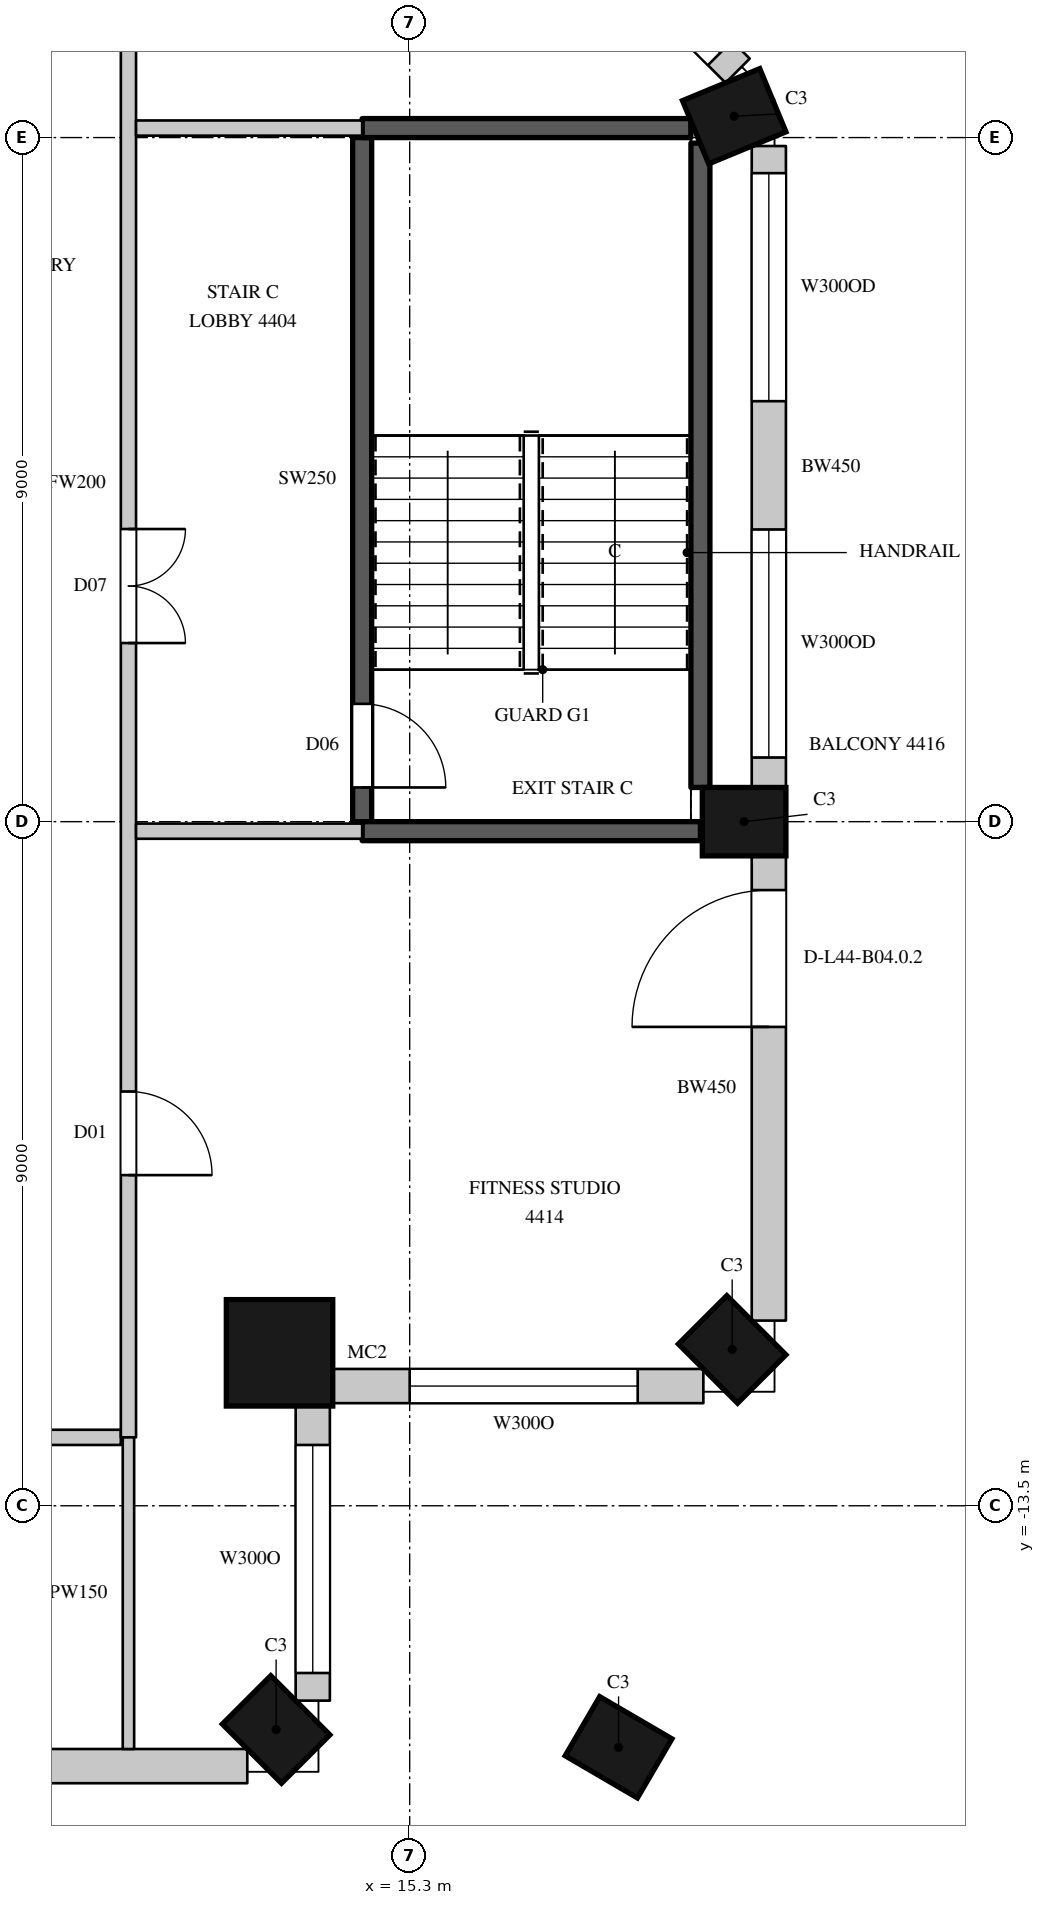
"""IFC4 building model, lengths in metres.
Left out: names, types, materials, properties, quantities, classifications, styles, units other than length and angle.
Written with IfcOpenShell. Run it as: python <this file> out.ifc"""

import sys

from ifc_helpers import new_model, si_unit, direction, frame, frame_2d, origin, origin_2d, place, context, subcontext, project, spatial, rectangle, circle, extrude, element, fill, save


model = new_model("IFC4")
c1 = context("Model", 3, precision=1e-05, world=origin(), true_north=direction((0.0, 1.0)))
c2 = subcontext(c1, "Body", "Model", "MODEL_VIEW")
j1 = project(units=[si_unit("LENGTHUNIT", "METRE"), si_unit("PLANEANGLEUNIT", "RADIAN")], contexts=[c1])
p1 = place(None, origin())
s1 = spatial("IfcSite", under=j1, at=p1, CompositionType="ELEMENT")
p2 = place(p1, origin())
s2 = spatial("IfcBuilding", under=s1, at=p2, CompositionType="ELEMENT")
p3 = place(p2, frame((0.0, 0.0, 201.5)))
s3 = spatial("IfcBuildingStorey", under=s2, at=p3, CompositionType="ELEMENT", Elevation=201.5)
p4 = place(p3, frame((13.543, -16.443, 0.0), z_axis=(0.0, 0.0, 1.0), x_axis=(0.707106781187, 0.707106781187, 0.0)))
e1 = element("IfcColumn", 1, at=p4, inside=s3, PredefinedType="COLUMN", context=c2, shape_type="SweptSolid", body=[
    extrude(rectangle(XDim=0.9, YDim=1.1, at=origin_2d()), origin(), (0.0, 0.0, 1.0), 4.1),
])
p5 = place(p3, frame((13.588, -11.488, 0.0), z_axis=(0.0, 0.0, 1.0), x_axis=(1.0, 0.0, 0.0)))
e2 = element("IfcColumn", 2, at=p5, inside=s3, PredefinedType="COLUMN", context=c2, shape_type="SweptSolid", body=[
    extrude(circle(Radius=0.7, at=origin_2d()), origin(), (0.0, 0.0, 1.0), 4.1),
])
for number, where, z_axis, x_axis in (
    (3, (19.543, -11.443, 0.0), (0.0, 0.0, 1.0), (0.707, 0.707, 0.0)),
    (4, (19.7, -4.5, 0.0), (0.0, 0.0, 1.0), (0.0, 1.0, 0.0)),
    (5, (19.57, 4.78, 0.0), (0.0, 0.0, 1.0), (-0.383, 0.924, 0.0)),
    (6, (18.048, -16.677, 0.0), (0.0, 0.0, 1.0), (0.504, 0.863, 0.0)),
):
    element("IfcColumn", number, at=place(p3, frame(where, z_axis=z_axis, x_axis=x_axis)), inside=s3, PredefinedType="COLUMN", context=c2, shape_type="SweptSolid", body=[
        extrude(rectangle(XDim=0.9, YDim=1.1, at=origin_2d()), origin(), (0.0, 0.0, 1.0), 4.1),
    ])
p6 = place(p3, frame((6.75, -16.925, 0.0), z_axis=(0.0, 0.0, 1.0), x_axis=(1.0, 0.0, 0.0)))
e7 = element("IfcWall", 7, at=p6, inside=s3, PredefinedType="SOLIDWALL", context=c2, shape_type="SweptSolid", body=[
    extrude(rectangle(XDim=6.414, YDim=0.45, at=frame_2d((3.207, 0.0))), origin(), (0.0, 0.0, 1.0), 3.8),
])
p7 = place(p6, frame((0.525, 0.0, 0.0)))
e8 = element("IfcOpeningElement", 8, at=p7, cuts=e7, PredefinedType="OPENING", context=c2, shape_type="SweptSolid", body=[
    extrude(rectangle(XDim=1.8, YDim=2.4, at=frame_2d((0.9, 1.2))), frame((0.0, 0.235, 0.0), z_axis=(0.0, -1.0, 0.0), x_axis=(1.0, 0.0, 0.0)), (0.0, 0.0, 1.0), 0.47),
])
p8 = place(p3, frame((14.025, -16.064, 0.0), z_axis=(0.0, 0.0, 1.0), x_axis=(0.0, 1.0, 0.0)))
e9 = element("IfcWall", 9, at=p8, inside=s3, PredefinedType="SOLIDWALL", context=c2, shape_type="SweptSolid", body=[
    extrude(rectangle(XDim=3.909, YDim=0.45, at=frame_2d((1.955, 0.0))), origin(), (0.0, 0.0, 1.0), 3.8),
])
p9 = place(p8, frame((0.364, 0.0, 1.05)))
e10 = element("IfcOpeningElement", 10, at=p9, cuts=e9, PredefinedType="OPENING", context=c2, shape_type="SweptSolid", body=[
    extrude(rectangle(XDim=3.0, YDim=2.4, at=frame_2d((1.5, 1.2))), frame((0.0, 0.235, 0.0), z_axis=(0.0, -1.0, 0.0), x_axis=(1.0, 0.0, 0.0)), (0.0, 0.0, 1.0), 0.47),
])
p10 = place(p3, frame((14.255, -11.925, 0.0), z_axis=(0.0, 0.0, 1.0), x_axis=(1.0, 0.0, 0.0)))
e11 = element("IfcWall", 11, at=p10, inside=s3, PredefinedType="SOLIDWALL", context=c2, shape_type="SweptSolid", body=[
    extrude(rectangle(XDim=4.909, YDim=0.45, at=frame_2d((2.455, 0.0))), origin(), (0.0, 0.0, 1.0), 3.8),
])
p11 = place(p10, frame((1.045, 0.0, 1.05)))
e12 = element("IfcOpeningElement", 12, at=p11, cuts=e11, PredefinedType="OPENING", context=c2, shape_type="SweptSolid", body=[
    extrude(rectangle(XDim=3.0, YDim=2.4, at=frame_2d((1.5, 1.2))), frame((0.0, 0.235, 0.0), z_axis=(0.0, -1.0, 0.0), x_axis=(1.0, 0.0, 0.0)), (0.0, 0.0, 1.0), 0.47),
])
p12 = place(p3, frame((20.025, -11.064, 0.0), z_axis=(0.0, 0.0, 1.0), x_axis=(0.0, 1.0, 0.0)))
e13 = element("IfcWall", 13, at=p12, inside=s3, PredefinedType="SOLIDWALL", context=c2, shape_type="SweptSolid", body=[
    extrude(rectangle(XDim=6.114, YDim=0.45, at=frame_2d((3.057, 0.0))), origin(), (0.0, 0.0, 1.0), 3.8),
])
p13 = place(p12, frame((3.864, 0.0, 0.0)))
e14 = element("IfcOpeningElement", 14, at=p13, cuts=e13, PredefinedType="OPENING", context=c2, shape_type="SweptSolid", body=[
    extrude(rectangle(XDim=1.8, YDim=2.4, at=frame_2d((0.9, 1.2))), frame((0.0, 0.235, 0.0), z_axis=(0.0, -1.0, 0.0), x_axis=(1.0, 0.0, 0.0)), (0.0, 0.0, 1.0), 0.47),
])
p14 = place(p3, frame((20.025, -4.05, 0.0), z_axis=(0.0, 0.0, 1.0), x_axis=(0.0, 1.0, 0.0)))
e15 = element("IfcWall", 15, at=p14, inside=s3, PredefinedType="SOLIDWALL", context=c2, shape_type="SweptSolid", body=[
    extrude(rectangle(XDim=8.439, YDim=0.45, at=frame_2d((4.219, 0.0))), origin(), (0.0, 0.0, 1.0), 3.8),
])
p15 = place(p14, frame((0.394, 0.0, 1.05)))
e16 = element("IfcOpeningElement", 16, at=p15, cuts=e15, PredefinedType="OPENING", context=c2, shape_type="SweptSolid", body=[
    extrude(rectangle(XDim=3.0, YDim=2.4, at=frame_2d((1.5, 1.2))), frame((0.0, 0.235, 0.0), z_axis=(0.0, -1.0, 0.0), x_axis=(1.0, 0.0, 0.0)), (0.0, 0.0, 1.0), 0.47),
])
p16 = place(p14, frame((5.082, 0.0, 1.05)))
e17 = element("IfcOpeningElement", 17, at=p16, cuts=e15, PredefinedType="OPENING", context=c2, shape_type="SweptSolid", body=[
    extrude(rectangle(XDim=3.0, YDim=2.4, at=frame_2d((1.5, 1.2))), frame((0.0, 0.235, 0.0), z_axis=(0.0, -1.0, 0.0), x_axis=(1.0, 0.0, 0.0)), (0.0, 0.0, 1.0), 0.47),
])
p17 = place(p3, frame((19.615, 5.379, 0.0), z_axis=(0.0, 0.0, 1.0), x_axis=(-0.707089646058, 0.7071239159, 0.0)))
e18 = element("IfcWall", 18, at=p17, inside=s3, PredefinedType="SOLIDWALL", context=c2, shape_type="SweptSolid", body=[
    extrude(rectangle(XDim=7.124, YDim=0.45, at=frame_2d((3.562, 0.0))), origin(), (0.0, 0.0, 1.0), 3.8),
])
p18 = place(p17, frame((0.328, 0.0, 1.05)))
e19 = element("IfcOpeningElement", 19, at=p18, cuts=e18, PredefinedType="OPENING", context=c2, shape_type="SweptSolid", body=[
    extrude(rectangle(XDim=2.4, YDim=2.4, at=frame_2d((1.2, 1.2))), frame((0.0, 0.235, 0.0), z_axis=(0.0, -1.0, 0.0), x_axis=(1.0, 0.0, 0.0)), (0.0, 0.0, 1.0), 0.47),
])
p19 = place(p17, frame((4.359, 0.0, 1.05)))
e20 = element("IfcOpeningElement", 20, at=p19, cuts=e18, PredefinedType="OPENING", context=c2, shape_type="SweptSolid", body=[
    extrude(rectangle(XDim=2.4, YDim=2.4, at=frame_2d((1.2, 1.2))), frame((0.0, 0.235, 0.0), z_axis=(0.0, -1.0, 0.0), x_axis=(1.0, 0.0, 0.0)), (0.0, 0.0, 1.0), 0.47),
])
p20 = place(p3, frame((6.28, -12.6, 0.0), z_axis=(0.0, 0.0, 1.0), x_axis=(1.0, 0.0, 0.0)))
e21 = element("IfcWall", 21, at=p20, inside=s3, PredefinedType="PARTITIONING", context=c2, shape_type="SweptSolid", body=[
    extrude(rectangle(XDim=5.22, YDim=0.2, at=frame_2d((2.61, 0.0))), origin(), (0.0, 0.0, 1.0), 3.8),
])
p21 = place(p20, frame((0.8, 0.0, 0.0)))
e22 = element("IfcOpeningElement", 22, at=p21, cuts=e21, PredefinedType="OPENING", context=c2, shape_type="SweptSolid", body=[
    extrude(rectangle(XDim=1.1, YDim=2.4, at=frame_2d((0.55, 1.2))), frame((0.0, 0.11, 0.0), z_axis=(0.0, -1.0, 0.0), x_axis=(1.0, 0.0, 0.0)), (0.0, 0.0, 1.0), 0.22),
])
p22 = place(p3, frame((11.6, -12.6, 0.0), z_axis=(0.0, 0.0, 1.0), x_axis=(0.0, 1.0, 0.0)))
e23 = element("IfcWall", 23, at=p22, inside=s3, PredefinedType="PARTITIONING", context=c2, shape_type="SweptSolid", body=[
    extrude(rectangle(XDim=25.1, YDim=0.2, at=frame_2d((12.55, 0.0))), origin(), (0.0, 0.0, 1.0), 3.8),
])
p23 = place(p22, frame((10.45, 0.0, 0.0)))
e24 = element("IfcOpeningElement", 24, at=p23, cuts=e23, PredefinedType="OPENING", context=c2, shape_type="SweptSolid", body=[
    extrude(rectangle(XDim=1.5, YDim=2.4, at=frame_2d((0.75, 1.2))), frame((0.0, 0.11, 0.0), z_axis=(0.0, -1.0, 0.0), x_axis=(1.0, 0.0, 0.0)), (0.0, 0.0, 1.0), 0.22),
])
p24 = place(p22, frame((3.45, 0.0, 0.0)))
e25 = element("IfcOpeningElement", 25, at=p24, cuts=e23, PredefinedType="OPENING", context=c2, shape_type="SweptSolid", body=[
    extrude(rectangle(XDim=1.1, YDim=2.4, at=frame_2d((0.55, 1.2))), frame((0.0, 0.11, 0.0), z_axis=(0.0, -1.0, 0.0), x_axis=(1.0, 0.0, 0.0)), (0.0, 0.0, 1.0), 0.22),
])
for number, where, z_axis, x_axis in (
    (26, (11.7, -4.625, 0.0), (0.0, 0.0, 1.0), (1.0, 0.0, 0.0)),
    (27, (11.7, 4.625, 0.0), (0.0, 0.0, 1.0), (1.0, 0.0, 0.0)),
):
    element("IfcWall", number, at=place(p3, frame(where, z_axis=z_axis, x_axis=x_axis)), inside=s3, PredefinedType="PARTITIONING", context=c2, shape_type="SweptSolid", body=[
        extrude(rectangle(XDim=2.975, YDim=0.2, at=frame_2d((1.488, 0.0))), origin(), (0.0, 0.0, 1.0), 3.8),
    ])
p25 = place(p3, frame((11.6, -16.7, 0.0), z_axis=(0.0, 0.0, 1.0), x_axis=(0.0, 1.0, 0.0)))
e28 = element("IfcWall", 28, at=p25, inside=s3, PredefinedType="PARTITIONING", context=c2, shape_type="SweptSolid", body=[
    extrude(rectangle(XDim=4.1, YDim=0.15, at=frame_2d((2.05, 0.0))), origin(), (0.0, 0.0, 1.0), 3.8),
])
p26 = place(p3, frame((14.675, -4.5, 0.0), z_axis=(0.0, 0.0, 1.0), x_axis=(0.0, 1.0, 0.0)))
e29 = element("IfcWall", 29, at=p26, inside=s3, PredefinedType="SHEAR", context=c2, shape_type="SweptSolid", body=[
    extrude(rectangle(XDim=9.0, YDim=0.25, at=frame_2d((4.5, 0.0))), origin(), (0.0, 0.0, 1.0), 3.8),
])
p27 = place(p26, frame((0.45, 0.0, 0.0)))
e30 = element("IfcOpeningElement", 30, at=p27, cuts=e29, PredefinedType="OPENING", context=c2, shape_type="SweptSolid", body=[
    extrude(rectangle(XDim=1.1, YDim=2.2, at=frame_2d((0.55, 1.1))), frame((0.0, 0.135, 0.0), z_axis=(0.0, -1.0, 0.0), x_axis=(1.0, 0.0, 0.0)), (0.0, 0.0, 1.0), 0.27),
])
p28 = place(p3, frame((14.675, -4.625, 0.0), z_axis=(0.0, 0.0, 1.0), x_axis=(1.0, 0.0, 0.0)))
e31 = element("IfcWall", 31, at=p28, inside=s3, PredefinedType="SHEAR", context=c2, shape_type="SweptSolid", body=[
    extrude(rectangle(XDim=4.45, YDim=0.25, at=frame_2d((2.225, 0.0))), origin(), (0.0, 0.0, 1.0), 3.8),
])
p29 = place(p3, frame((14.675, 4.625, 0.0), z_axis=(0.0, 0.0, 1.0), x_axis=(1.0, 0.0, 0.0)))
e32 = element("IfcWall", 32, at=p29, inside=s3, PredefinedType="SHEAR", context=c2, shape_type="SweptSolid", body=[
    extrude(rectangle(XDim=4.324, YDim=0.25, at=frame_2d((2.162, 0.0))), origin(), (0.0, 0.0, 1.0), 3.8),
])
p30 = place(p3, frame((19.125, -4.05, 0.0), z_axis=(0.0, 0.0, 1.0), x_axis=(0.0, 1.0, 0.0)))
e33 = element("IfcWall", 33, at=p30, inside=s3, PredefinedType="SHEAR", context=c2, shape_type="SweptSolid", body=[
    extrude(rectangle(XDim=8.477, YDim=0.25, at=frame_2d((4.238, 0.0))), origin(), (0.0, 0.0, 1.0), 3.8),
])
p31 = place(p9, origin())
e34 = element("IfcWindow", 34, at=p31, inside=s3, PartitioningType="SINGLE_PANEL", PredefinedType="WINDOW", context=c2, shape_type="SweptSolid", body=[
    extrude(rectangle(XDim=3.0, YDim=2.4, at=frame_2d((1.5, 1.2))), frame((0.0, 0.135, 0.0), z_axis=(0.0, -1.0, 0.0), x_axis=(1.0, 0.0, 0.0)), (0.0, 0.0, 1.0), 0.06),
])
fill(e10, e34)
p32 = place(p11, origin())
e35 = element("IfcWindow", 35, at=p32, inside=s3, PartitioningType="SINGLE_PANEL", PredefinedType="WINDOW", context=c2, shape_type="SweptSolid", body=[
    extrude(rectangle(XDim=3.0, YDim=2.4, at=frame_2d((1.5, 1.2))), frame((0.0, 0.135, 0.0), z_axis=(0.0, -1.0, 0.0), x_axis=(1.0, 0.0, 0.0)), (0.0, 0.0, 1.0), 0.06),
])
fill(e12, e35)
p33 = place(p13, origin())
e36 = element("IfcDoor", 36, at=p33, inside=s3, OperationType="SLIDING_TO_LEFT", PredefinedType="DOOR", context=c2, shape_type="SweptSolid", body=[
    extrude(rectangle(XDim=1.8, YDim=2.4, at=frame_2d((0.9, 1.2))), frame((0.0, 0.13, 0.0), z_axis=(0.0, -1.0, 0.0), x_axis=(1.0, 0.0, 0.0)), (0.0, 0.0, 1.0), 0.05),
])
fill(e14, e36)
p34 = place(p15, origin())
e37 = element("IfcWindow", 37, at=p34, inside=s3, PartitioningType="SINGLE_PANEL", PredefinedType="WINDOW", context=c2, shape_type="SweptSolid", body=[
    extrude(rectangle(XDim=3.0, YDim=2.4, at=frame_2d((1.5, 1.2))), frame((0.0, 0.135, 0.0), z_axis=(0.0, -1.0, 0.0), x_axis=(1.0, 0.0, 0.0)), (0.0, 0.0, 1.0), 0.06),
])
fill(e16, e37)
p35 = place(p16, origin())
e38 = element("IfcWindow", 38, at=p35, inside=s3, PartitioningType="SINGLE_PANEL", PredefinedType="WINDOW", context=c2, shape_type="SweptSolid", body=[
    extrude(rectangle(XDim=3.0, YDim=2.4, at=frame_2d((1.5, 1.2))), frame((0.0, 0.135, 0.0), z_axis=(0.0, -1.0, 0.0), x_axis=(1.0, 0.0, 0.0)), (0.0, 0.0, 1.0), 0.06),
])
fill(e17, e38)
p36 = place(p18, origin())
e39 = element("IfcWindow", 39, at=p36, inside=s3, PartitioningType="SINGLE_PANEL", PredefinedType="WINDOW", context=c2, shape_type="SweptSolid", body=[
    extrude(rectangle(XDim=2.4, YDim=2.4, at=frame_2d((1.2, 1.2))), frame((0.0, 0.135, 0.0), z_axis=(0.0, -1.0, 0.0), x_axis=(1.0, 0.0, 0.0)), (0.0, 0.0, 1.0), 0.06),
])
fill(e19, e39)
p37 = place(p23, origin())
e40 = element("IfcDoor", 40, at=p37, inside=s3, OperationType="DOUBLE_DOOR_SINGLE_SWING", PredefinedType="DOOR", context=c2, shape_type="SweptSolid", body=[
    extrude(rectangle(XDim=1.5, YDim=2.4, at=frame_2d((0.75, 1.2))), frame((0.0, 0.025, 0.0), z_axis=(0.0, -1.0, 0.0), x_axis=(1.0, 0.0, 0.0)), (0.0, 0.0, 1.0), 0.05),
])
fill(e24, e40)
p38 = place(p24, origin())
e41 = element("IfcDoor", 41, at=p38, inside=s3, OperationType="SINGLE_SWING_RIGHT", PredefinedType="DOOR", context=c2, shape_type="SweptSolid", body=[
    extrude(rectangle(XDim=1.1, YDim=2.4, at=frame_2d((0.55, 1.2))), frame((0.0, 0.025, 0.0), z_axis=(0.0, -1.0, 0.0), x_axis=(1.0, 0.0, 0.0)), (0.0, 0.0, 1.0), 0.05),
])
fill(e25, e41)
p39 = place(p27, origin())
e42 = element("IfcDoor", 42, at=p39, inside=s3, OperationType="SINGLE_SWING_RIGHT", PredefinedType="DOOR", context=c2, shape_type="SweptSolid", body=[
    extrude(rectangle(XDim=1.1, YDim=2.2, at=frame_2d((0.55, 1.1))), frame((0.0, 0.025, 0.0), z_axis=(0.0, -1.0, 0.0), x_axis=(1.0, 0.0, 0.0)), (0.0, 0.0, 1.0), 0.05),
])
fill(e30, e42)
save(model, sys.argv[1])
